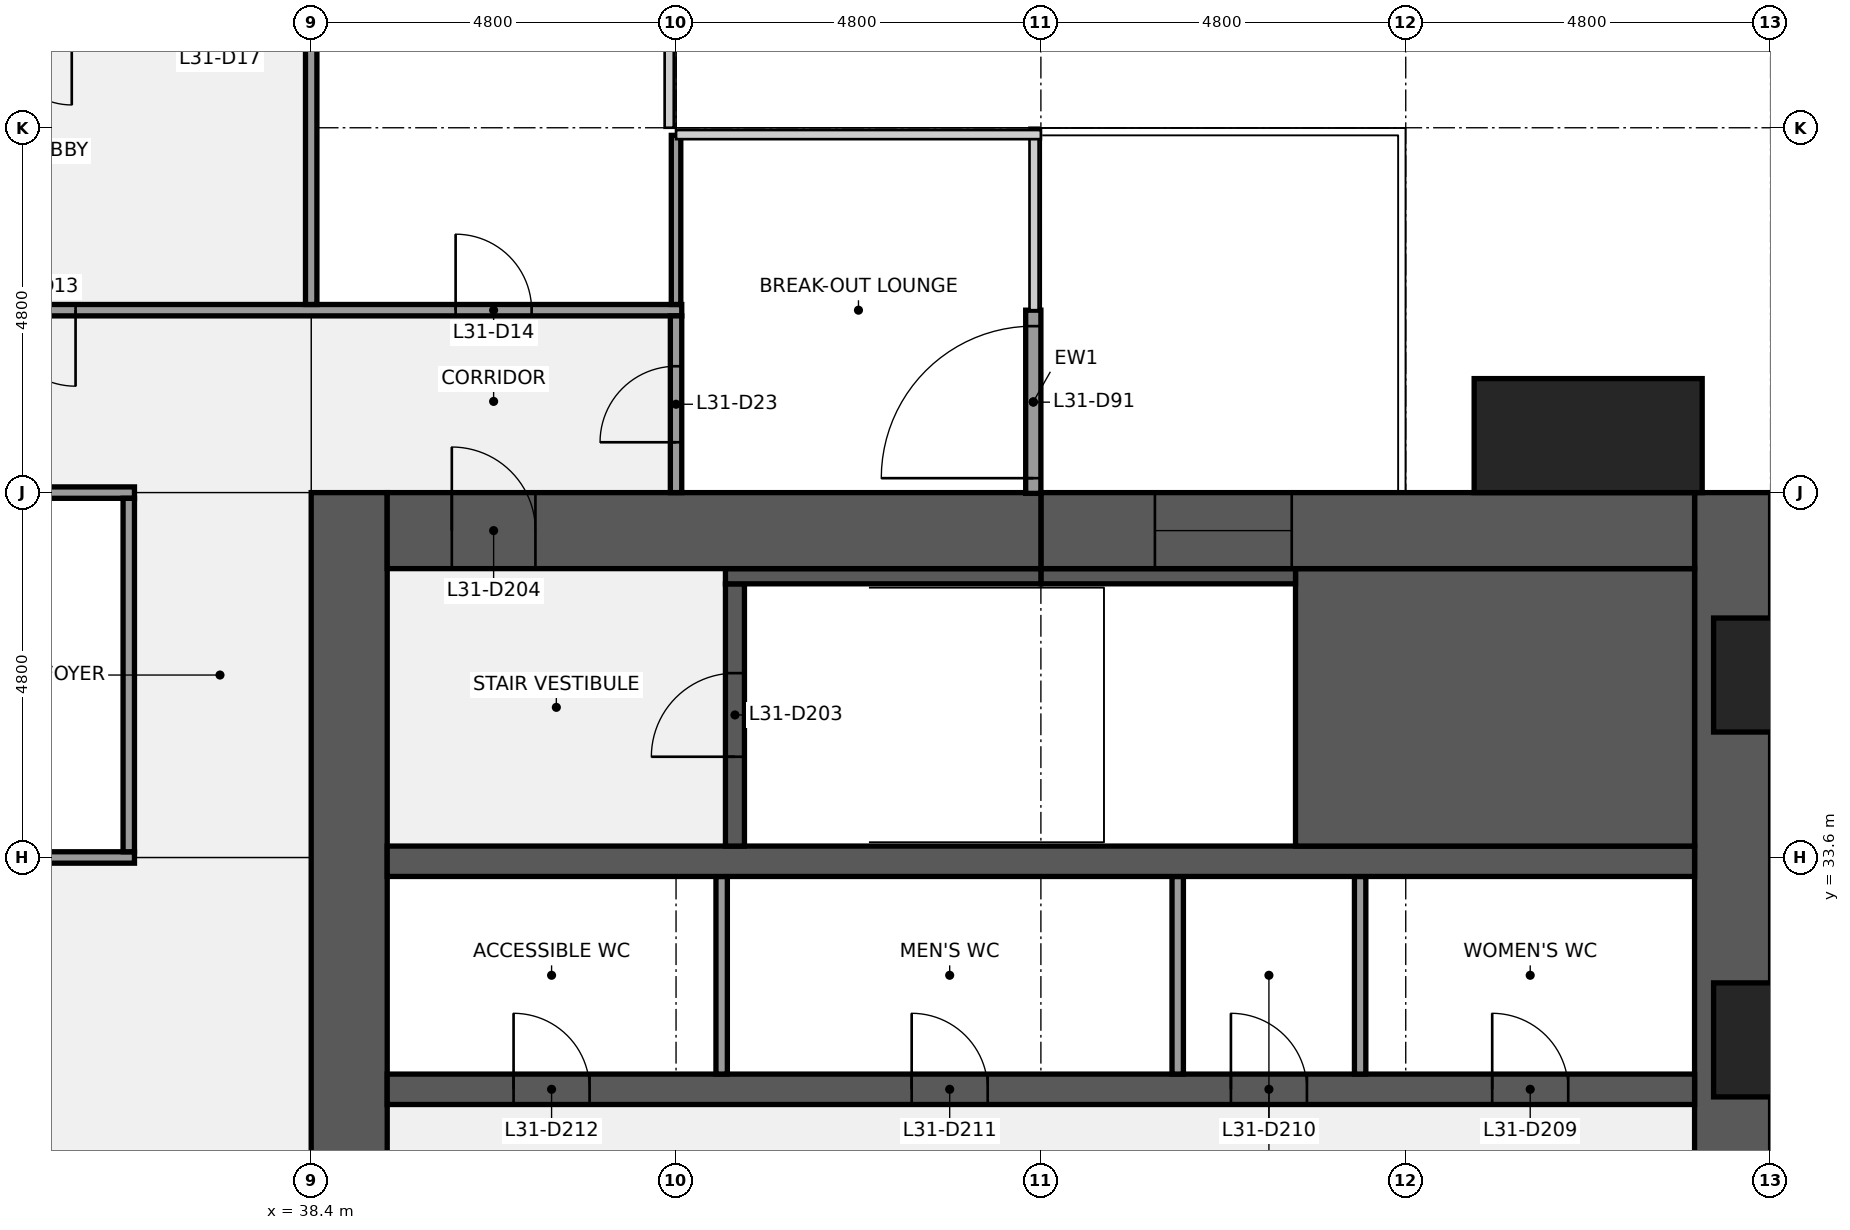
"""IFC4 building model, lengths in metres.
Left out: names, types, materials, properties, quantities, classifications, styles, units other than length and angle.
Written with IfcOpenShell. Run it as: python <this file> out.ifc"""

import sys

from ifc_helpers import new_model, si_unit, direction, frame, frame_2d, origin, origin_2d, place, context, subcontext, project, spatial, rectangle, extrude, element, fill, save


model = new_model("IFC4")
c1 = context("Model", 3, precision=1e-05, world=origin(), true_north=direction((0.0, 1.0)))
c2 = subcontext(c1, "Body", "Model", "MODEL_VIEW")
j1 = project(units=[si_unit("LENGTHUNIT", "METRE"), si_unit("PLANEANGLEUNIT", "RADIAN")], contexts=[c1])
p1 = place(None, origin())
s1 = spatial("IfcSite", under=j1, at=p1, CompositionType="ELEMENT")
p2 = place(p1, origin())
s2 = spatial("IfcBuilding", under=s1, at=p2, CompositionType="ELEMENT")
p3 = place(p2, frame((0.0, 0.0, 144.1)))
s3 = spatial("IfcBuildingStorey", under=s2, at=p3, CompositionType="ELEMENT", Elevation=144.1)
p4 = place(p3, frame((57.1, 38.4, 0.0), z_axis=(0.0, 0.0, 1.0), x_axis=(0.0, -1.0, 0.0)))
e1 = element("IfcWall", 1, at=p4, inside=s3, PredefinedType="SHEAR", context=c2, shape_type="SweptSolid", body=[
    extrude(rectangle(XDim=28.8, YDim=1.0, at=frame_2d((14.4, 0.0))), origin(), (0.0, 0.0, 1.0), 3.84),
])
p5 = place(p4, frame((18.45, 0.0, 0.9)))
e2 = element("IfcOpeningElement", 2, at=p5, cuts=e1, PredefinedType="OPENING", context=c2, shape_type="SweptSolid", body=[
    extrude(rectangle(XDim=1.5, YDim=1.5, at=frame_2d((0.75, 0.75))), frame((0.0, 0.51, 0.0), z_axis=(0.0, -1.0, 0.0), x_axis=(1.0, 0.0, 0.0)), (0.0, 0.0, 1.0), 1.02),
])
p6 = place(p4, frame((8.85, 0.0, 0.9)))
e3 = element("IfcOpeningElement", 3, at=p6, cuts=e1, PredefinedType="OPENING", context=c2, shape_type="SweptSolid", body=[
    extrude(rectangle(XDim=1.5, YDim=1.5, at=frame_2d((0.75, 0.75))), frame((0.0, 0.51, 0.0), z_axis=(0.0, -1.0, 0.0), x_axis=(1.0, 0.0, 0.0)), (0.0, 0.0, 1.0), 1.02),
])
p7 = place(p3, frame((38.9, 9.6, 0.0), z_axis=(0.0, 0.0, 1.0), x_axis=(0.0, 1.0, 0.0)))
e4 = element("IfcWall", 4, at=p7, inside=s3, PredefinedType="SHEAR", context=c2, shape_type="SweptSolid", body=[
    extrude(rectangle(XDim=28.8, YDim=1.0, at=frame_2d((14.4, 0.0))), origin(), (0.0, 0.0, 1.0), 3.84),
])
p8 = place(p7, frame((8.7, 0.0, 0.0)))
e5 = element("IfcOpeningElement", 5, at=p8, cuts=e4, PredefinedType="OPENING", context=c2, shape_type="SweptSolid", body=[
    extrude(rectangle(XDim=1.8, YDim=2.1, at=frame_2d((0.9, 1.05))), frame((0.0, 0.51, 0.0), z_axis=(0.0, -1.0, 0.0), x_axis=(1.0, 0.0, 0.0)), (0.0, 0.0, 1.0), 1.02),
])
p9 = place(p7, frame((18.3, 0.0, 0.0)))
e6 = element("IfcOpeningElement", 6, at=p9, cuts=e4, PredefinedType="OPENING", context=c2, shape_type="SweptSolid", body=[
    extrude(rectangle(XDim=1.8, YDim=2.1, at=frame_2d((0.9, 1.05))), frame((0.0, 0.51, 0.0), z_axis=(0.0, -1.0, 0.0), x_axis=(1.0, 0.0, 0.0)), (0.0, 0.0, 1.0), 1.02),
])
p10 = place(p3, frame((39.4, 30.55, 0.0), z_axis=(0.0, 0.0, 1.0), x_axis=(1.0, 0.0, 0.0)))
e7 = element("IfcWall", 7, at=p10, inside=s3, PredefinedType="SHEAR", context=c2, shape_type="SweptSolid", body=[
    extrude(rectangle(XDim=17.2, YDim=0.4, at=frame_2d((8.6, 0.0))), origin(), (0.0, 0.0, 1.0), 3.84),
])
p11 = place(p10, frame((14.538, 0.0, 0.0)))
e8 = element("IfcOpeningElement", 8, at=p11, cuts=e7, PredefinedType="OPENING", context=c2, shape_type="SweptSolid", body=[
    extrude(rectangle(XDim=1.0, YDim=2.1, at=frame_2d((0.5, 1.05))), frame((0.0, 0.21, 0.0), z_axis=(0.0, -1.0, 0.0), x_axis=(1.0, 0.0, 0.0)), (0.0, 0.0, 1.0), 0.42),
])
p12 = place(p10, frame((11.1, 0.0, 0.0)))
e9 = element("IfcOpeningElement", 9, at=p12, cuts=e7, PredefinedType="OPENING", context=c2, shape_type="SweptSolid", body=[
    extrude(rectangle(XDim=1.0, YDim=2.1, at=frame_2d((0.5, 1.05))), frame((0.0, 0.21, 0.0), z_axis=(0.0, -1.0, 0.0), x_axis=(1.0, 0.0, 0.0)), (0.0, 0.0, 1.0), 0.42),
])
p13 = place(p10, frame((6.9, 0.0, 0.0)))
e10 = element("IfcOpeningElement", 10, at=p13, cuts=e7, PredefinedType="OPENING", context=c2, shape_type="SweptSolid", body=[
    extrude(rectangle(XDim=1.0, YDim=2.1, at=frame_2d((0.5, 1.05))), frame((0.0, 0.21, 0.0), z_axis=(0.0, -1.0, 0.0), x_axis=(1.0, 0.0, 0.0)), (0.0, 0.0, 1.0), 0.42),
])
p14 = place(p10, frame((1.663, 0.0, 0.0)))
e11 = element("IfcOpeningElement", 11, at=p14, cuts=e7, PredefinedType="OPENING", context=c2, shape_type="SweptSolid", body=[
    extrude(rectangle(XDim=1.0, YDim=2.1, at=frame_2d((0.5, 1.05))), frame((0.0, 0.21, 0.0), z_axis=(0.0, -1.0, 0.0), x_axis=(1.0, 0.0, 0.0)), (0.0, 0.0, 1.0), 0.42),
])
for number, where, z_axis, x_axis in (
    (12, (52.2, 30.75, 0.0), (0.0, 0.0, 1.0), (0.0, 1.0, 0.0)),
    (13, (49.8, 30.75, 0.0), (0.0, 0.0, 1.0), (0.0, 1.0, 0.0)),
    (14, (43.8, 30.75, 0.0), (0.0, 0.0, 1.0), (0.0, 1.0, 0.0)),
):
    element("IfcWall", number, at=place(p3, frame(where, z_axis=z_axis, x_axis=x_axis)), inside=s3, PredefinedType="PARTITIONING", context=c2, shape_type="SweptSolid", body=[
        extrude(rectangle(XDim=2.6, YDim=0.15, at=frame_2d((1.3, 0.0))), origin(), (0.0, 0.0, 1.0), 3.84),
    ])
p15 = place(p3, frame((39.4, 33.55, 0.0), z_axis=(0.0, 0.0, 1.0), x_axis=(1.0, 0.0, 0.0)))
e15 = element("IfcWall", 15, at=p15, inside=s3, PredefinedType="SHEAR", context=c2, shape_type="SweptSolid", body=[
    extrude(rectangle(XDim=17.2, YDim=0.4, at=frame_2d((8.6, 0.0))), origin(), (0.0, 0.0, 1.0), 3.84),
])
p16 = place(p3, frame((51.35, 35.575, 0.0), z_axis=(0.0, 0.0, 1.0), x_axis=(1.0, 0.0, 0.0)))
e16 = element("IfcWall", 16, at=p16, inside=s3, PredefinedType="SHEAR", context=c2, shape_type="SweptSolid", body=[
    extrude(rectangle(XDim=5.25, YDim=3.65, at=frame_2d((2.625, 0.0))), origin(), (0.0, 0.0, 1.0), 3.84),
])
p17 = place(p3, frame((43.975, 33.75, 0.0), z_axis=(0.0, 0.0, 1.0), x_axis=(0.0, 1.0, 0.0)))
e17 = element("IfcWall", 17, at=p17, inside=s3, PredefinedType="SHEAR", context=c2, shape_type="SweptSolid", body=[
    extrude(rectangle(XDim=3.45, YDim=0.25, at=frame_2d((1.725, 0.0))), origin(), (0.0, 0.0, 1.0), 3.84),
])
p18 = place(p17, frame((1.175, 0.0, 0.0)))
e18 = element("IfcOpeningElement", 18, at=p18, cuts=e17, PredefinedType="OPENING", context=c2, shape_type="SweptSolid", body=[
    extrude(rectangle(XDim=1.1, YDim=2.1, at=frame_2d((0.55, 1.05))), frame((0.0, 0.135, 0.0), z_axis=(0.0, -1.0, 0.0), x_axis=(1.0, 0.0, 0.0)), (0.0, 0.0, 1.0), 0.27),
])
p19 = place(p3, frame((48.0, 37.3, 0.0), z_axis=(0.0, 0.0, 1.0), x_axis=(1.0, 0.0, 0.0)))
e19 = element("IfcWall", 19, at=p19, inside=s3, PredefinedType="SHEAR", context=c2, shape_type="SweptSolid", body=[
    extrude(rectangle(XDim=3.35, YDim=0.2, at=frame_2d((1.675, 0.0))), origin(), (0.0, 0.0, 1.0), 3.84),
])
p20 = place(p3, frame((43.85, 37.3, 0.0), z_axis=(0.0, 0.0, 1.0), x_axis=(1.0, 0.0, 0.0)))
e20 = element("IfcWall", 20, at=p20, inside=s3, PredefinedType="SHEAR", context=c2, shape_type="SweptSolid", body=[
    extrude(rectangle(XDim=4.15, YDim=0.2, at=frame_2d((2.075, 0.0))), origin(), (0.0, 0.0, 1.0), 3.84),
])
p21 = place(p3, frame((48.0, 37.9, 0.0), z_axis=(0.0, 0.0, 1.0), x_axis=(1.0, 0.0, 0.0)))
e21 = element("IfcWall", 21, at=p21, inside=s3, PredefinedType="SHEAR", context=c2, shape_type="SweptSolid", body=[
    extrude(rectangle(XDim=8.6, YDim=1.0, at=frame_2d((4.3, 0.0))), origin(), (0.0, 0.0, 1.0), 3.84),
])
p22 = place(p21, frame((1.5, 0.0, 0.9)))
e22 = element("IfcOpeningElement", 22, at=p22, cuts=e21, PredefinedType="OPENING", context=c2, shape_type="SweptSolid", body=[
    extrude(rectangle(XDim=1.8, YDim=1.5, at=frame_2d((0.9, 0.75))), frame((0.0, 0.51, 0.0), z_axis=(0.0, -1.0, 0.0), x_axis=(1.0, 0.0, 0.0)), (0.0, 0.0, 1.0), 1.02),
])
p23 = place(p3, frame((39.4, 37.9, 0.0), z_axis=(0.0, 0.0, 1.0), x_axis=(1.0, 0.0, 0.0)))
e23 = element("IfcWall", 23, at=p23, inside=s3, PredefinedType="SHEAR", context=c2, shape_type="SweptSolid", body=[
    extrude(rectangle(XDim=8.6, YDim=1.0, at=frame_2d((4.3, 0.0))), origin(), (0.0, 0.0, 1.0), 3.84),
])
p24 = place(p23, frame((0.85, 0.0, 0.0)))
e24 = element("IfcOpeningElement", 24, at=p24, cuts=e23, PredefinedType="OPENING", context=c2, shape_type="SweptSolid", body=[
    extrude(rectangle(XDim=1.1, YDim=2.1, at=frame_2d((0.55, 1.05))), frame((0.0, 0.51, 0.0), z_axis=(0.0, -1.0, 0.0), x_axis=(1.0, 0.0, 0.0)), (0.0, 0.0, 1.0), 1.02),
])
p25 = place(p3, frame((33.675, 33.6, 0.0), z_axis=(0.0, 0.0, 1.0), x_axis=(1.0, 0.0, 0.0)))
e25 = element("IfcWall", 25, at=p25, inside=s3, PredefinedType="PARTITIONING", context=c2, shape_type="SweptSolid", body=[
    extrude(rectangle(XDim=2.4, YDim=0.15, at=frame_2d((1.2, 0.0))), origin(), (0.0, 0.0, 1.0), 2.936),
])
p26 = place(p3, frame((21.525, 38.4, 0.0), z_axis=(0.0, 0.0, 1.0), x_axis=(1.0, 0.0, 0.0)))
e26 = element("IfcWall", 26, at=p26, inside=s3, PredefinedType="PARTITIONING", context=c2, shape_type="SweptSolid", body=[
    extrude(rectangle(XDim=14.55, YDim=0.15, at=frame_2d((7.275, 0.0))), origin(), (0.0, 0.0, 1.0), 2.936),
])
p27 = place(p26, frame((2.575, 0.0, 0.0)))
e27 = element("IfcOpeningElement", 27, at=p27, cuts=e26, PredefinedType="OPENING", context=c2, shape_type="SweptSolid", body=[
    extrude(rectangle(XDim=1.0, YDim=2.1, at=frame_2d((0.5, 1.05))), frame((0.0, 0.085, 0.0), z_axis=(0.0, -1.0, 0.0), x_axis=(1.0, 0.0, 0.0)), (0.0, 0.0, 1.0), 0.17),
])
p28 = place(p26, frame((9.775, 0.0, 0.0)))
e28 = element("IfcOpeningElement", 28, at=p28, cuts=e26, PredefinedType="OPENING", context=c2, shape_type="SweptSolid", body=[
    extrude(rectangle(XDim=1.0, YDim=2.1, at=frame_2d((0.5, 1.05))), frame((0.0, 0.085, 0.0), z_axis=(0.0, -1.0, 0.0), x_axis=(1.0, 0.0, 0.0)), (0.0, 0.0, 1.0), 0.17),
])
p29 = place(p3, frame((14.325, 40.8, 0.0), z_axis=(0.0, 0.0, 1.0), x_axis=(1.0, 0.0, 0.0)))
e29 = element("IfcWall", 29, at=p29, inside=s3, PredefinedType="PARTITIONING", context=c2, shape_type="SweptSolid", body=[
    extrude(rectangle(XDim=28.95, YDim=0.15, at=frame_2d((14.475, 0.0))), origin(), (0.0, 0.0, 1.0), 2.936),
])
p30 = place(p29, frame((1.975, 0.0, 0.0)))
e30 = element("IfcOpeningElement", 30, at=p30, cuts=e29, PredefinedType="OPENING", context=c2, shape_type="SweptSolid", body=[
    extrude(rectangle(XDim=1.0, YDim=2.1, at=frame_2d((0.5, 1.05))), frame((0.0, 0.085, 0.0), z_axis=(0.0, -1.0, 0.0), x_axis=(1.0, 0.0, 0.0)), (0.0, 0.0, 1.0), 0.17),
])
p31 = place(p29, frame((9.175, 0.0, 0.0)))
e31 = element("IfcOpeningElement", 31, at=p31, cuts=e29, PredefinedType="OPENING", context=c2, shape_type="SweptSolid", body=[
    extrude(rectangle(XDim=1.0, YDim=2.1, at=frame_2d((0.5, 1.05))), frame((0.0, 0.085, 0.0), z_axis=(0.0, -1.0, 0.0), x_axis=(1.0, 0.0, 0.0)), (0.0, 0.0, 1.0), 0.17),
])
p32 = place(p29, frame((15.175, 0.0, 0.0)))
e32 = element("IfcOpeningElement", 32, at=p32, cuts=e29, PredefinedType="OPENING", context=c2, shape_type="SweptSolid", body=[
    extrude(rectangle(XDim=1.0, YDim=2.1, at=frame_2d((0.5, 1.05))), frame((0.0, 0.085, 0.0), z_axis=(0.0, -1.0, 0.0), x_axis=(1.0, 0.0, 0.0)), (0.0, 0.0, 1.0), 0.17),
])
p33 = place(p29, frame((19.975, 0.0, 0.0)))
e33 = element("IfcOpeningElement", 33, at=p33, cuts=e29, PredefinedType="OPENING", context=c2, shape_type="SweptSolid", body=[
    extrude(rectangle(XDim=1.0, YDim=2.1, at=frame_2d((0.5, 1.05))), frame((0.0, 0.085, 0.0), z_axis=(0.0, -1.0, 0.0), x_axis=(1.0, 0.0, 0.0)), (0.0, 0.0, 1.0), 0.17),
])
p34 = place(p29, frame((25.975, 0.0, 0.0)))
e34 = element("IfcOpeningElement", 34, at=p34, cuts=e29, PredefinedType="OPENING", context=c2, shape_type="SweptSolid", body=[
    extrude(rectangle(XDim=1.0, YDim=2.1, at=frame_2d((0.5, 1.05))), frame((0.0, 0.085, 0.0), z_axis=(0.0, -1.0, 0.0), x_axis=(1.0, 0.0, 0.0)), (0.0, 0.0, 1.0), 0.17),
])
p35 = place(p3, frame((36.0, 33.675, 0.0), z_axis=(0.0, 0.0, 1.0), x_axis=(0.0, 1.0, 0.0)))
e35 = element("IfcWall", 35, at=p35, inside=s3, PredefinedType="PARTITIONING", context=c2, shape_type="SweptSolid", body=[
    extrude(rectangle(XDim=4.65, YDim=0.15, at=frame_2d((2.325, 0.0))), origin(), (0.0, 0.0, 1.0), 2.936),
])
p36 = place(p3, frame((38.4, 40.875, 0.0), z_axis=(0.0, 0.0, 1.0), x_axis=(0.0, 1.0, 0.0)))
e36 = element("IfcWall", 36, at=p36, inside=s3, PredefinedType="PARTITIONING", context=c2, shape_type="SweptSolid", body=[
    extrude(rectangle(XDim=3.45, YDim=0.15, at=frame_2d((1.725, 0.0))), origin(), (0.0, 0.0, 1.0), 2.936),
])
p37 = place(p3, frame((43.2, 40.875, 0.0), z_axis=(0.0, 0.0, 1.0), x_axis=(0.0, 1.0, 0.0)))
e37 = element("IfcWall", 37, at=p37, inside=s3, PredefinedType="PARTITIONING", context=c2, shape_type="SweptSolid", body=[
    extrude(rectangle(XDim=2.225, YDim=0.125, at=frame_2d((1.113, 0.0))), origin(), (0.0, 0.0, 1.0), 2.936),
])
p38 = place(p3, frame((43.2, 38.4, 0.0), z_axis=(0.0, 0.0, 1.0), x_axis=(0.0, 1.0, 0.0)))
e38 = element("IfcWall", 38, at=p38, inside=s3, PredefinedType="PARTITIONING", context=c2, shape_type="SweptSolid", body=[
    extrude(rectangle(XDim=2.325, YDim=0.15, at=frame_2d((1.163, 0.0))), origin(), (0.0, 0.0, 1.0), 2.936),
])
p39 = place(p38, frame((0.663, 0.0, 0.0)))
e39 = element("IfcOpeningElement", 39, at=p39, cuts=e38, PredefinedType="OPENING", context=c2, shape_type="SweptSolid", body=[
    extrude(rectangle(XDim=1.0, YDim=2.1, at=frame_2d((0.5, 1.05))), frame((0.0, 0.085, 0.0), z_axis=(0.0, -1.0, 0.0), x_axis=(1.0, 0.0, 0.0)), (0.0, 0.0, 1.0), 0.17),
])
p40 = place(p3, frame((55.2, 39.15, 0.0), z_axis=(0.0, 0.0, 1.0), x_axis=(1.0, 0.0, 0.0)))
e40 = element("IfcColumn", 40, at=p40, inside=s3, PredefinedType="PILASTER", context=c2, shape_type="SweptSolid", body=[
    extrude(rectangle(XDim=3.0, YDim=1.5, at=origin_2d()), origin(), (0.0, 0.0, 1.0), 4.0),
])
p41 = place(p3, frame((47.9, 38.39, 0.0), z_axis=(0.0, 0.0, 1.0), x_axis=(0.0, 1.0, 0.0)))
e41 = element("IfcWall", 41, at=p41, inside=s3, PredefinedType="SOLIDWALL", context=c2, shape_type="SweptSolid", body=[
    extrude(rectangle(XDim=2.41, YDim=0.2, at=frame_2d((1.205, 0.0))), origin(), (0.0, 0.0, 1.0), 3.238),
])
p42 = place(p41, frame((0.2, 0.0, 0.0)))
e42 = element("IfcOpeningElement", 42, at=p42, cuts=e41, PredefinedType="OPENING", context=c2, shape_type="SweptSolid", body=[
    extrude(rectangle(XDim=2.0, YDim=2.1, at=frame_2d((1.0, 1.05))), frame((0.0, 0.11, 0.0), z_axis=(0.0, -1.0, 0.0), x_axis=(1.0, 0.0, 0.0)), (0.0, 0.0, 1.0), 0.22),
])
p43 = place(p18, origin())
e43 = element("IfcDoor", 43, at=p43, inside=s3, OperationType="SINGLE_SWING_LEFT", PredefinedType="DOOR", context=c2, shape_type="SweptSolid", body=[
    extrude(rectangle(XDim=1.1, YDim=2.1, at=frame_2d((0.55, 1.05))), frame((0.0, 0.025, 0.0), z_axis=(0.0, -1.0, 0.0), x_axis=(1.0, 0.0, 0.0)), (0.0, 0.0, 1.0), 0.05),
])
fill(e18, e43)
p44 = place(p24, origin())
e44 = element("IfcDoor", 44, at=p44, inside=s3, OperationType="SINGLE_SWING_LEFT", PredefinedType="DOOR", context=c2, shape_type="SweptSolid", body=[
    extrude(rectangle(XDim=1.1, YDim=2.1, at=frame_2d((0.55, 1.05))), frame((0.0, 0.025, 0.0), z_axis=(0.0, -1.0, 0.0), x_axis=(1.0, 0.0, 0.0)), (0.0, 0.0, 1.0), 0.05),
])
fill(e24, e44)
p45 = place(p11, origin())
e45 = element("IfcDoor", 45, at=p45, inside=s3, OperationType="SINGLE_SWING_LEFT", PredefinedType="DOOR", context=c2, shape_type="SweptSolid", body=[
    extrude(rectangle(XDim=1.0, YDim=2.1, at=frame_2d((0.5, 1.05))), frame((0.0, 0.025, 0.0), z_axis=(0.0, -1.0, 0.0), x_axis=(1.0, 0.0, 0.0)), (0.0, 0.0, 1.0), 0.05),
])
fill(e8, e45)
p46 = place(p12, origin())
e46 = element("IfcDoor", 46, at=p46, inside=s3, OperationType="SINGLE_SWING_LEFT", PredefinedType="DOOR", context=c2, shape_type="SweptSolid", body=[
    extrude(rectangle(XDim=1.0, YDim=2.1, at=frame_2d((0.5, 1.05))), frame((0.0, 0.025, 0.0), z_axis=(0.0, -1.0, 0.0), x_axis=(1.0, 0.0, 0.0)), (0.0, 0.0, 1.0), 0.05),
])
fill(e9, e46)
p47 = place(p13, origin())
e47 = element("IfcDoor", 47, at=p47, inside=s3, OperationType="SINGLE_SWING_LEFT", PredefinedType="DOOR", context=c2, shape_type="SweptSolid", body=[
    extrude(rectangle(XDim=1.0, YDim=2.1, at=frame_2d((0.5, 1.05))), frame((0.0, 0.025, 0.0), z_axis=(0.0, -1.0, 0.0), x_axis=(1.0, 0.0, 0.0)), (0.0, 0.0, 1.0), 0.05),
])
fill(e10, e47)
p48 = place(p14, origin())
e48 = element("IfcDoor", 48, at=p48, inside=s3, OperationType="SINGLE_SWING_LEFT", PredefinedType="DOOR", context=c2, shape_type="SweptSolid", body=[
    extrude(rectangle(XDim=1.0, YDim=2.1, at=frame_2d((0.5, 1.05))), frame((0.0, 0.025, 0.0), z_axis=(0.0, -1.0, 0.0), x_axis=(1.0, 0.0, 0.0)), (0.0, 0.0, 1.0), 0.05),
])
fill(e11, e48)
p49 = place(p22, origin())
e49 = element("IfcWindow", 49, at=p49, inside=s3, PartitioningType="SINGLE_PANEL", PredefinedType="WINDOW", context=c2, shape_type="SweptSolid", body=[
    extrude(rectangle(XDim=1.8, YDim=1.5, at=frame_2d((0.9, 0.75))), frame((0.0, 0.03, 0.0), z_axis=(0.0, -1.0, 0.0), x_axis=(1.0, 0.0, 0.0)), (0.0, 0.0, 1.0), 0.06),
])
fill(e22, e49)
p50 = place(p33, origin())
e50 = element("IfcDoor", 50, at=p50, inside=s3, OperationType="SINGLE_SWING_RIGHT", PredefinedType="DOOR", context=c2, shape_type="SweptSolid", body=[
    extrude(rectangle(XDim=1.0, YDim=2.1, at=frame_2d((0.5, 1.05))), frame((0.0, 0.025, 0.0), z_axis=(0.0, -1.0, 0.0), x_axis=(1.0, 0.0, 0.0)), (0.0, 0.0, 1.0), 0.05),
])
fill(e33, e50)
p51 = place(p34, origin())
e51 = element("IfcDoor", 51, at=p51, inside=s3, OperationType="SINGLE_SWING_LEFT", PredefinedType="DOOR", context=c2, shape_type="SweptSolid", body=[
    extrude(rectangle(XDim=1.0, YDim=2.1, at=frame_2d((0.5, 1.05))), frame((0.0, 0.025, 0.0), z_axis=(0.0, -1.0, 0.0), x_axis=(1.0, 0.0, 0.0)), (0.0, 0.0, 1.0), 0.05),
])
fill(e34, e51)
p52 = place(p39, origin())
e52 = element("IfcDoor", 52, at=p52, inside=s3, OperationType="SINGLE_SWING_LEFT", PredefinedType="DOOR", context=c2, shape_type="SweptSolid", body=[
    extrude(rectangle(XDim=1.0, YDim=2.1, at=frame_2d((0.5, 1.05))), frame((0.0, 0.025, 0.0), z_axis=(0.0, -1.0, 0.0), x_axis=(1.0, 0.0, 0.0)), (0.0, 0.0, 1.0), 0.05),
])
fill(e39, e52)
p53 = place(p42, origin())
e53 = element("IfcDoor", 53, at=p53, inside=s3, OperationType="SINGLE_SWING_LEFT", PredefinedType="DOOR", context=c2, shape_type="SweptSolid", body=[
    extrude(rectangle(XDim=2.0, YDim=2.1, at=frame_2d((1.0, 1.05))), frame((0.0, 0.025, 0.0), z_axis=(0.0, -1.0, 0.0), x_axis=(1.0, 0.0, 0.0)), (0.0, 0.0, 1.0), 0.05),
])
fill(e42, e53)
save(model, sys.argv[1])
